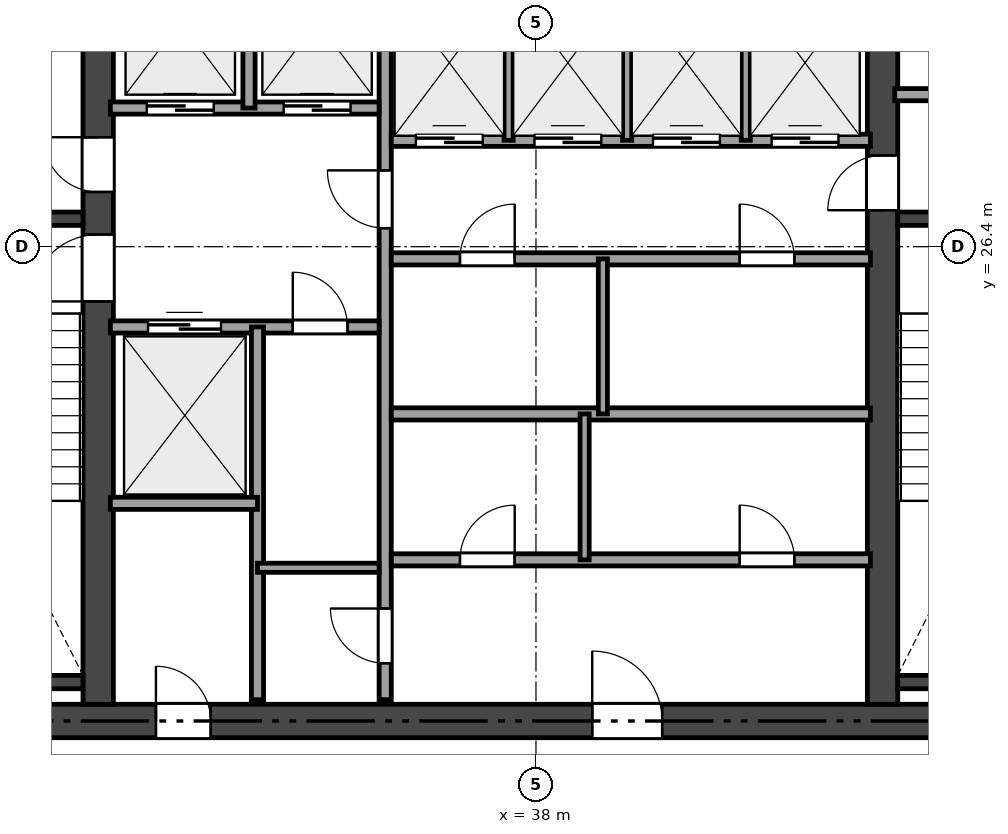
"""IFC4 building model, lengths in metres.
Left out: names, types, materials, properties, quantities, classifications, styles, units other than length and angle.
Written with IfcOpenShell. Run it as: python <this file> out.ifc"""

import sys

from ifc_helpers import new_model, si_unit, direction, frame, frame_2d, origin, place, context, subcontext, project, spatial, rectangle, extrude, element, fill, save


model = new_model("IFC4")
c1 = context("Model", 3, precision=1e-05, world=origin(), true_north=direction((0.0, 1.0)))
c2 = subcontext(c1, "Body", "Model", "MODEL_VIEW")
j1 = project(units=[si_unit("LENGTHUNIT", "METRE"), si_unit("PLANEANGLEUNIT", "RADIAN")], contexts=[c1])
p1 = place(None, origin())
s1 = spatial("IfcSite", under=j1, at=p1, CompositionType="ELEMENT")
p2 = place(p1, origin())
s2 = spatial("IfcBuilding", under=s1, at=p2, CompositionType="ELEMENT")
p3 = place(p2, frame((0.0, 0.0, 275.1)))
s3 = spatial("IfcBuildingStorey", under=s2, at=p3, CompositionType="ELEMENT", Elevation=275.1)
p4 = place(p3, frame((26.525, 18.6, 0.0), z_axis=(0.0, 0.0, 1.0), x_axis=(1.0, 0.0, 0.0)))
e1 = element("IfcWall", 1, at=p4, inside=s3, PredefinedType="SHEAR", context=c2, shape_type="SweptSolid", body=[
    extrude(rectangle(XDim=21.35, YDim=0.55, at=frame_2d((10.675, 0.0))), origin(), (0.0, 0.0, 1.0), 3.92),
])
p5 = place(p4, frame((12.4, 0.0, 0.0)))
e2 = element("IfcOpeningElement", 2, at=p5, cuts=e1, PredefinedType="OPENING", context=c2, shape_type="SweptSolid", body=[
    extrude(rectangle(XDim=1.15, YDim=2.15, at=frame_2d((0.575, 1.075))), frame((0.0, 0.285, 0.0), z_axis=(0.0, -1.0, 0.0), x_axis=(1.0, 0.0, 0.0)), (0.0, 0.0, 1.0), 0.57),
])
p6 = place(p4, frame((5.225, 0.0, 0.0)))
e3 = element("IfcOpeningElement", 3, at=p6, cuts=e1, PredefinedType="OPENING", context=c2, shape_type="SweptSolid", body=[
    extrude(rectangle(XDim=0.9, YDim=2.1, at=frame_2d((0.45, 1.05))), frame((0.0, 0.285, 0.0), z_axis=(0.0, -1.0, 0.0), x_axis=(1.0, 0.0, 0.0)), (0.0, 0.0, 1.0), 0.57),
])
p7 = place(p3, frame((30.8, 18.875, 0.0), z_axis=(0.0, 0.0, 1.0), x_axis=(0.0, 1.0, 0.0)))
e4 = element("IfcWall", 4, at=p7, inside=s3, PredefinedType="SHEAR", context=c2, shape_type="SweptSolid", body=[
    extrude(rectangle(XDim=15.05, YDim=0.5, at=frame_2d((7.525, 0.0))), origin(), (0.0, 0.0, 1.0), 3.92),
])
p8 = place(p7, frame((6.625, 0.0, 0.0)))
e5 = element("IfcOpeningElement", 5, at=p8, cuts=e4, PredefinedType="OPENING", context=c2, shape_type="SweptSolid", body=[
    extrude(rectangle(XDim=1.1, YDim=2.15, at=frame_2d((0.55, 1.075))), frame((0.0, 0.26, 0.0), z_axis=(0.0, -1.0, 0.0), x_axis=(1.0, 0.0, 0.0)), (0.0, 0.0, 1.0), 0.52),
])
p9 = place(p7, frame((8.425, 0.0, 0.0)))
e6 = element("IfcOpeningElement", 6, at=p9, cuts=e4, PredefinedType="OPENING", context=c2, shape_type="SweptSolid", body=[
    extrude(rectangle(XDim=0.9, YDim=2.1, at=frame_2d((0.45, 1.05))), frame((0.0, 0.26, 0.0), z_axis=(0.0, -1.0, 0.0), x_axis=(1.0, 0.0, 0.0)), (0.0, 0.0, 1.0), 0.52),
])
p10 = place(p3, frame((43.7, 18.875, 0.0), z_axis=(0.0, 0.0, 1.0), x_axis=(0.0, 1.0, 0.0)))
e7 = element("IfcWall", 7, at=p10, inside=s3, PredefinedType="SHEAR", context=c2, shape_type="SweptSolid", body=[
    extrude(rectangle(XDim=15.05, YDim=0.5, at=frame_2d((7.525, 0.0))), origin(), (0.0, 0.0, 1.0), 3.92),
])
p11 = place(p10, frame((8.125, 0.0, 0.0)))
e8 = element("IfcOpeningElement", 8, at=p11, cuts=e7, PredefinedType="OPENING", context=c2, shape_type="SweptSolid", body=[
    extrude(rectangle(XDim=0.9, YDim=2.1, at=frame_2d((0.45, 1.05))), frame((0.0, 0.26, 0.0), z_axis=(0.0, -1.0, 0.0), x_axis=(1.0, 0.0, 0.0)), (0.0, 0.0, 1.0), 0.52),
])
for number, where, z_axis, x_axis in (
    (9, (27.075, 26.86, 0.0), (0.0, 0.0, 1.0), (1.0, 0.0, 0.0)),
    (10, (27.075, 19.24, 0.0), (0.0, 0.0, 1.0), (1.0, 0.0, 0.0)),
):
    element("IfcWall", number, at=place(p3, frame(where, z_axis=z_axis, x_axis=x_axis)), inside=s3, PredefinedType="SHEAR", context=c2, shape_type="SweptSolid", body=[
        extrude(rectangle(XDim=3.475, YDim=0.22, at=frame_2d((1.738, 0.0))), origin(), (0.0, 0.0, 1.0), 3.92),
    ])
for number, where, z_axis, x_axis in (
    (11, (43.95, 26.86, 0.0), (0.0, 0.0, 1.0), (1.0, 0.0, 0.0)),
    (12, (43.95, 19.24, 0.0), (0.0, 0.0, 1.0), (1.0, 0.0, 0.0)),
):
    element("IfcWall", number, at=place(p3, frame(where, z_axis=z_axis, x_axis=x_axis)), inside=s3, PredefinedType="SHEAR", context=c2, shape_type="SweptSolid", body=[
        extrude(rectangle(XDim=3.375, YDim=0.22, at=frame_2d((1.688, 0.0))), origin(), (0.0, 0.0, 1.0), 3.92),
    ])
p12 = place(p3, frame((43.9, 28.9, 0.0), z_axis=(0.0, 0.0, 1.0), x_axis=(1.0, 0.0, 0.0)))
e13 = element("IfcWall", 13, at=p12, inside=s3, PredefinedType="SOLIDWALL", context=c2, shape_type="SweptSolid", body=[
    extrude(rectangle(XDim=3.35, YDim=0.2, at=frame_2d((1.675, 0.0))), origin(), (0.0, 0.0, 1.0), 3.92),
])
p13 = place(p12, frame((1.15, 0.0, 0.0)))
e14 = element("IfcOpeningElement", 14, at=p13, cuts=e13, PredefinedType="OPENING", context=c2, shape_type="SweptSolid", body=[
    extrude(rectangle(XDim=0.9, YDim=2.1, at=frame_2d((0.45, 1.05))), frame((0.0, 0.11, 0.0), z_axis=(0.0, -1.0, 0.0), x_axis=(1.0, 0.0, 0.0)), (0.0, 0.0, 1.0), 0.22),
])
p14 = place(p3, frame((35.52, 18.95, 0.0), z_axis=(0.0, 0.0, 1.0), x_axis=(0.0, 1.0, 0.0)))
e15 = element("IfcWall", 15, at=p14, inside=s3, PredefinedType="SOLIDWALL", context=c2, shape_type="SweptSolid", body=[
    extrude(rectangle(XDim=14.9, YDim=0.2, at=frame_2d((7.45, 0.0))), origin(), (0.0, 0.0, 1.0), 3.441),
])
p15 = place(p14, frame((7.755, 0.0, 0.0)))
e16 = element("IfcOpeningElement", 16, at=p15, cuts=e15, PredefinedType="OPENING", context=c2, shape_type="SweptSolid", body=[
    extrude(rectangle(XDim=0.95, YDim=2.15, at=frame_2d((0.475, 1.075))), frame((0.0, 0.11, 0.0), z_axis=(0.0, -1.0, 0.0), x_axis=(1.0, 0.0, 0.0)), (0.0, 0.0, 1.0), 0.22),
])
p16 = place(p14, frame((0.6, 0.0, 0.0)))
e17 = element("IfcOpeningElement", 17, at=p16, cuts=e15, PredefinedType="OPENING", context=c2, shape_type="SweptSolid", body=[
    extrude(rectangle(XDim=0.9, YDim=2.1, at=frame_2d((0.45, 1.05))), frame((0.0, 0.11, 0.0), z_axis=(0.0, -1.0, 0.0), x_axis=(1.0, 0.0, 0.0)), (0.0, 0.0, 1.0), 0.22),
])
p17 = place(p3, frame((31.0, 28.68, 0.0), z_axis=(0.0, 0.0, 1.0), x_axis=(1.0, 0.0, 0.0)))
e18 = element("IfcWall", 18, at=p17, inside=s3, PredefinedType="SOLIDWALL", context=c2, shape_type="SweptSolid", body=[
    extrude(rectangle(XDim=4.42, YDim=0.2, at=frame_2d((2.21, 0.0))), origin(), (0.0, 0.0, 1.0), 3.92),
])
p18 = place(p17, frame((0.6, 0.0, 0.0)))
e19 = element("IfcOpeningElement", 19, at=p18, cuts=e18, PredefinedType="OPENING", context=c2, shape_type="SweptSolid", body=[
    extrude(rectangle(XDim=1.1, YDim=2.15, at=frame_2d((0.55, 1.075))), frame((0.0, 0.11, 0.0), z_axis=(0.0, -1.0, 0.0), x_axis=(1.0, 0.0, 0.0)), (0.0, 0.0, 1.0), 0.22),
])
p19 = place(p17, frame((2.85, 0.0, 0.0)))
e20 = element("IfcOpeningElement", 20, at=p19, cuts=e18, PredefinedType="OPENING", context=c2, shape_type="SweptSolid", body=[
    extrude(rectangle(XDim=1.1, YDim=2.15, at=frame_2d((0.55, 1.075))), frame((0.0, 0.11, 0.0), z_axis=(0.0, -1.0, 0.0), x_axis=(1.0, 0.0, 0.0)), (0.0, 0.0, 1.0), 0.22),
])
p20 = place(p3, frame((33.28, 28.68, 0.0), z_axis=(0.0, 0.0, 1.0), x_axis=(0.0, 1.0, 0.0)))
e21 = element("IfcWall", 21, at=p20, inside=s3, PredefinedType="SOLIDWALL", context=c2, shape_type="SweptSolid", body=[
    extrude(rectangle(XDim=2.82, YDim=0.2, at=frame_2d((1.41, 0.0))), origin(), (0.0, 0.0, 1.0), 3.92),
])
p21 = place(p3, frame((31.0, 25.08, 0.0), z_axis=(0.0, 0.0, 1.0), x_axis=(1.0, 0.0, 0.0)))
e22 = element("IfcWall", 22, at=p21, inside=s3, PredefinedType="SOLIDWALL", context=c2, shape_type="SweptSolid", body=[
    extrude(rectangle(XDim=4.42, YDim=0.2, at=frame_2d((2.21, 0.0))), origin(), (0.0, 0.0, 1.0), 3.92),
])
p22 = place(p21, frame((3.0, 0.0, 0.0)))
e23 = element("IfcOpeningElement", 23, at=p22, cuts=e22, PredefinedType="OPENING", context=c2, shape_type="SweptSolid", body=[
    extrude(rectangle(XDim=0.9, YDim=2.1, at=frame_2d((0.45, 1.05))), frame((0.0, 0.11, 0.0), z_axis=(0.0, -1.0, 0.0), x_axis=(1.0, 0.0, 0.0)), (0.0, 0.0, 1.0), 0.22),
])
p23 = place(p21, frame((0.62, 0.0, 0.0)))
e24 = element("IfcOpeningElement", 24, at=p23, cuts=e22, PredefinedType="OPENING", context=c2, shape_type="SweptSolid", body=[
    extrude(rectangle(XDim=1.2, YDim=2.15, at=frame_2d((0.6, 1.075))), frame((0.0, 0.11, 0.0), z_axis=(0.0, -1.0, 0.0), x_axis=(1.0, 0.0, 0.0)), (0.0, 0.0, 1.0), 0.22),
])
p24 = place(p3, frame((33.42, 18.95, 0.0), z_axis=(0.0, 0.0, 1.0), x_axis=(0.0, 1.0, 0.0)))
e25 = element("IfcWall", 25, at=p24, inside=s3, PredefinedType="SOLIDWALL", context=c2, shape_type="SweptSolid", body=[
    extrude(rectangle(XDim=6.13, YDim=0.2, at=frame_2d((3.065, 0.0))), origin(), (0.0, 0.0, 1.0), 3.441),
])
p25 = place(p3, frame((31.0, 22.18, 0.0), z_axis=(0.0, 0.0, 1.0), x_axis=(1.0, 0.0, 0.0)))
e26 = element("IfcWall", 26, at=p25, inside=s3, PredefinedType="SOLIDWALL", context=c2, shape_type="SweptSolid", body=[
    extrude(rectangle(XDim=2.42, YDim=0.2, at=frame_2d((1.21, 0.0))), origin(), (0.0, 0.0, 1.0), 3.92),
])
p26 = place(p3, frame((33.42, 21.12, 0.0), z_axis=(0.0, 0.0, 1.0), x_axis=(1.0, 0.0, 0.0)))
e27 = element("IfcWall", 27, at=p26, inside=s3, PredefinedType="PARTITIONING", context=c2, shape_type="SweptSolid", body=[
    extrude(rectangle(XDim=2.0, YDim=0.15, at=frame_2d((1.0, 0.0))), origin(), (0.0, 0.0, 1.0), 3.92),
])
p27 = place(p3, frame((35.62, 28.15, 0.0), z_axis=(0.0, 0.0, 1.0), x_axis=(1.0, 0.0, 0.0)))
e28 = element("IfcWall", 28, at=p27, inside=s3, PredefinedType="SOLIDWALL", context=c2, shape_type="SweptSolid", body=[
    extrude(rectangle(XDim=7.88, YDim=0.2, at=frame_2d((3.94, 0.0))), origin(), (0.0, 0.0, 1.0), 3.92),
])
p28 = place(p27, frame((0.405, 0.0, 0.0)))
e29 = element("IfcOpeningElement", 29, at=p28, cuts=e28, PredefinedType="OPENING", context=c2, shape_type="SweptSolid", body=[
    extrude(rectangle(XDim=1.1, YDim=2.15, at=frame_2d((0.55, 1.075))), frame((0.0, 0.11, 0.0), z_axis=(0.0, -1.0, 0.0), x_axis=(1.0, 0.0, 0.0)), (0.0, 0.0, 1.0), 0.22),
])
p29 = place(p27, frame((2.355, 0.0, 0.0)))
e30 = element("IfcOpeningElement", 30, at=p29, cuts=e28, PredefinedType="OPENING", context=c2, shape_type="SweptSolid", body=[
    extrude(rectangle(XDim=1.1, YDim=2.15, at=frame_2d((0.55, 1.075))), frame((0.0, 0.11, 0.0), z_axis=(0.0, -1.0, 0.0), x_axis=(1.0, 0.0, 0.0)), (0.0, 0.0, 1.0), 0.22),
])
p30 = place(p27, frame((4.305, 0.0, 0.0)))
e31 = element("IfcOpeningElement", 31, at=p30, cuts=e28, PredefinedType="OPENING", context=c2, shape_type="SweptSolid", body=[
    extrude(rectangle(XDim=1.1, YDim=2.15, at=frame_2d((0.55, 1.075))), frame((0.0, 0.11, 0.0), z_axis=(0.0, -1.0, 0.0), x_axis=(1.0, 0.0, 0.0)), (0.0, 0.0, 1.0), 0.22),
])
p31 = place(p27, frame((6.255, 0.0, 0.0)))
e32 = element("IfcOpeningElement", 32, at=p31, cuts=e28, PredefinedType="OPENING", context=c2, shape_type="SweptSolid", body=[
    extrude(rectangle(XDim=1.1, YDim=2.15, at=frame_2d((0.55, 1.075))), frame((0.0, 0.11, 0.0), z_axis=(0.0, -1.0, 0.0), x_axis=(1.0, 0.0, 0.0)), (0.0, 0.0, 1.0), 0.22),
])
p32 = place(p3, frame((35.62, 26.2, 0.0), z_axis=(0.0, 0.0, 1.0), x_axis=(1.0, 0.0, 0.0)))
e33 = element("IfcWall", 33, at=p32, inside=s3, PredefinedType="SOLIDWALL", context=c2, shape_type="SweptSolid", body=[
    extrude(rectangle(XDim=7.88, YDim=0.2, at=frame_2d((3.94, 0.0))), origin(), (0.0, 0.0, 1.0), 3.92),
])
p33 = place(p32, frame((1.13, 0.0, 0.0)))
e34 = element("IfcOpeningElement", 34, at=p33, cuts=e33, PredefinedType="OPENING", context=c2, shape_type="SweptSolid", body=[
    extrude(rectangle(XDim=0.9, YDim=2.1, at=frame_2d((0.45, 1.05))), frame((0.0, 0.11, 0.0), z_axis=(0.0, -1.0, 0.0), x_axis=(1.0, 0.0, 0.0)), (0.0, 0.0, 1.0), 0.22),
])
p34 = place(p32, frame((5.73, 0.0, 0.0)))
e35 = element("IfcOpeningElement", 35, at=p34, cuts=e33, PredefinedType="OPENING", context=c2, shape_type="SweptSolid", body=[
    extrude(rectangle(XDim=0.9, YDim=2.1, at=frame_2d((0.45, 1.05))), frame((0.0, 0.11, 0.0), z_axis=(0.0, -1.0, 0.0), x_axis=(1.0, 0.0, 0.0)), (0.0, 0.0, 1.0), 0.22),
])
p35 = place(p3, frame((35.62, 23.65, 0.0), z_axis=(0.0, 0.0, 1.0), x_axis=(1.0, 0.0, 0.0)))
e36 = element("IfcWall", 36, at=p35, inside=s3, PredefinedType="SOLIDWALL", context=c2, shape_type="SweptSolid", body=[
    extrude(rectangle(XDim=7.88, YDim=0.2, at=frame_2d((3.94, 0.0))), origin(), (0.0, 0.0, 1.0), 3.441),
])
p36 = place(p3, frame((35.62, 21.25, 0.0), z_axis=(0.0, 0.0, 1.0), x_axis=(1.0, 0.0, 0.0)))
e37 = element("IfcWall", 37, at=p36, inside=s3, PredefinedType="SOLIDWALL", context=c2, shape_type="SweptSolid", body=[
    extrude(rectangle(XDim=7.88, YDim=0.2, at=frame_2d((3.94, 0.0))), origin(), (0.0, 0.0, 1.0), 3.92),
])
p37 = place(p36, frame((1.13, 0.0, 0.0)))
e38 = element("IfcOpeningElement", 38, at=p37, cuts=e37, PredefinedType="OPENING", context=c2, shape_type="SweptSolid", body=[
    extrude(rectangle(XDim=0.9, YDim=2.1, at=frame_2d((0.45, 1.05))), frame((0.0, 0.11, 0.0), z_axis=(0.0, -1.0, 0.0), x_axis=(1.0, 0.0, 0.0)), (0.0, 0.0, 1.0), 0.22),
])
p38 = place(p36, frame((5.73, 0.0, 0.0)))
e39 = element("IfcOpeningElement", 39, at=p38, cuts=e37, PredefinedType="OPENING", context=c2, shape_type="SweptSolid", body=[
    extrude(rectangle(XDim=0.9, YDim=2.1, at=frame_2d((0.45, 1.05))), frame((0.0, 0.11, 0.0), z_axis=(0.0, -1.0, 0.0), x_axis=(1.0, 0.0, 0.0)), (0.0, 0.0, 1.0), 0.22),
])
for number, where, z_axis, x_axis in (
    (40, (37.55, 28.15, 0.0), (0.0, 0.0, 1.0), (0.0, 1.0, 0.0)),
    (41, (39.5, 28.15, 0.0), (0.0, 0.0, 1.0), (0.0, 1.0, 0.0)),
    (42, (41.45, 28.15, 0.0), (0.0, 0.0, 1.0), (0.0, 1.0, 0.0)),
):
    element("IfcWall", number, at=place(p3, frame(where, z_axis=z_axis, x_axis=x_axis)), inside=s3, PredefinedType="PARTITIONING", context=c2, shape_type="SweptSolid", body=[
        extrude(rectangle(XDim=2.43, YDim=0.15, at=frame_2d((1.215, 0.0))), origin(), (0.0, 0.0, 1.0), 3.92),
    ])
p39 = place(p3, frame((39.1, 23.65, 0.0), z_axis=(0.0, 0.0, 1.0), x_axis=(0.0, 1.0, 0.0)))
e43 = element("IfcWall", 43, at=p39, inside=s3, PredefinedType="PARTITIONING", context=c2, shape_type="SweptSolid", body=[
    extrude(rectangle(XDim=2.55, YDim=0.15, at=frame_2d((1.275, 0.0))), origin(), (0.0, 0.0, 1.0), 3.441),
])
p40 = place(p3, frame((38.8, 21.25, 0.0), z_axis=(0.0, 0.0, 1.0), x_axis=(0.0, 1.0, 0.0)))
e44 = element("IfcWall", 44, at=p40, inside=s3, PredefinedType="PARTITIONING", context=c2, shape_type="SweptSolid", body=[
    extrude(rectangle(XDim=2.4, YDim=0.15, at=frame_2d((1.2, 0.0))), origin(), (0.0, 0.0, 1.0), 3.441),
])
p41 = place(p8, origin())
e45 = element("IfcDoor", 45, at=p41, inside=s3, OperationType="SINGLE_SWING_LEFT", PredefinedType="DOOR", context=c2, shape_type="SweptSolid", body=[
    extrude(rectangle(XDim=1.1, YDim=2.15, at=frame_2d((0.55, 1.075))), frame((0.0, 0.025, 0.0), z_axis=(0.0, -1.0, 0.0), x_axis=(1.0, 0.0, 0.0)), (0.0, 0.0, 1.0), 0.05),
])
fill(e5, e45)
p42 = place(p15, origin())
e46 = element("IfcDoor", 46, at=p42, inside=s3, OperationType="SINGLE_SWING_RIGHT", PredefinedType="DOOR", context=c2, shape_type="SweptSolid", body=[
    extrude(rectangle(XDim=0.95, YDim=2.15, at=frame_2d((0.475, 1.075))), frame((0.0, 0.025, 0.0), z_axis=(0.0, -1.0, 0.0), x_axis=(1.0, 0.0, 0.0)), (0.0, 0.0, 1.0), 0.05),
])
fill(e16, e46)
p43 = place(p11, origin())
e47 = element("IfcDoor", 47, at=p43, inside=s3, OperationType="SINGLE_SWING_LEFT", PredefinedType="DOOR", context=c2, shape_type="SweptSolid", body=[
    extrude(rectangle(XDim=0.9, YDim=2.1, at=frame_2d((0.45, 1.05))), frame((0.0, 0.025, 0.0), z_axis=(0.0, -1.0, 0.0), x_axis=(1.0, 0.0, 0.0)), (0.0, 0.0, 1.0), 0.05),
])
fill(e8, e47)
p44 = place(p5, origin())
e48 = element("IfcDoor", 48, at=p44, inside=s3, OperationType="SINGLE_SWING_LEFT", PredefinedType="DOOR", context=c2, shape_type="SweptSolid", body=[
    extrude(rectangle(XDim=1.15, YDim=2.15, at=frame_2d((0.575, 1.075))), frame((0.0, 0.025, 0.0), z_axis=(0.0, -1.0, 0.0), x_axis=(1.0, 0.0, 0.0)), (0.0, 0.0, 1.0), 0.05),
])
fill(e2, e48)
p45 = place(p9, origin())
e49 = element("IfcDoor", 49, at=p45, inside=s3, OperationType="SINGLE_SWING_RIGHT", PredefinedType="DOOR", context=c2, shape_type="SweptSolid", body=[
    extrude(rectangle(XDim=0.9, YDim=2.1, at=frame_2d((0.45, 1.05))), frame((0.0, 0.025, 0.0), z_axis=(0.0, -1.0, 0.0), x_axis=(1.0, 0.0, 0.0)), (0.0, 0.0, 1.0), 0.05),
])
fill(e6, e49)
p46 = place(p6, origin())
e50 = element("IfcDoor", 50, at=p46, inside=s3, OperationType="SINGLE_SWING_LEFT", PredefinedType="DOOR", context=c2, shape_type="SweptSolid", body=[
    extrude(rectangle(XDim=0.9, YDim=2.1, at=frame_2d((0.45, 1.05))), frame((0.0, 0.025, 0.0), z_axis=(0.0, -1.0, 0.0), x_axis=(1.0, 0.0, 0.0)), (0.0, 0.0, 1.0), 0.05),
])
fill(e3, e50)
p47 = place(p16, origin())
e51 = element("IfcDoor", 51, at=p47, inside=s3, OperationType="SINGLE_SWING_RIGHT", PredefinedType="DOOR", context=c2, shape_type="SweptSolid", body=[
    extrude(rectangle(XDim=0.9, YDim=2.1, at=frame_2d((0.45, 1.05))), frame((0.0, 0.025, 0.0), z_axis=(0.0, -1.0, 0.0), x_axis=(1.0, 0.0, 0.0)), (0.0, 0.0, 1.0), 0.05),
])
fill(e17, e51)
p48 = place(p22, origin())
e52 = element("IfcDoor", 52, at=p48, inside=s3, OperationType="SINGLE_SWING_LEFT", PredefinedType="DOOR", context=c2, shape_type="SweptSolid", body=[
    extrude(rectangle(XDim=0.9, YDim=2.1, at=frame_2d((0.45, 1.05))), frame((0.0, 0.025, 0.0), z_axis=(0.0, -1.0, 0.0), x_axis=(1.0, 0.0, 0.0)), (0.0, 0.0, 1.0), 0.05),
])
fill(e23, e52)
p49 = place(p37, origin())
e53 = element("IfcDoor", 53, at=p49, inside=s3, OperationType="SINGLE_SWING_RIGHT", PredefinedType="DOOR", context=c2, shape_type="SweptSolid", body=[
    extrude(rectangle(XDim=0.9, YDim=2.1, at=frame_2d((0.45, 1.05))), frame((0.0, 0.025, 0.0), z_axis=(0.0, -1.0, 0.0), x_axis=(1.0, 0.0, 0.0)), (0.0, 0.0, 1.0), 0.05),
])
fill(e38, e53)
p50 = place(p38, origin())
e54 = element("IfcDoor", 54, at=p50, inside=s3, OperationType="SINGLE_SWING_LEFT", PredefinedType="DOOR", context=c2, shape_type="SweptSolid", body=[
    extrude(rectangle(XDim=0.9, YDim=2.1, at=frame_2d((0.45, 1.05))), frame((0.0, 0.025, 0.0), z_axis=(0.0, -1.0, 0.0), x_axis=(1.0, 0.0, 0.0)), (0.0, 0.0, 1.0), 0.05),
])
fill(e39, e54)
p51 = place(p33, origin())
e55 = element("IfcDoor", 55, at=p51, inside=s3, OperationType="SINGLE_SWING_RIGHT", PredefinedType="DOOR", context=c2, shape_type="SweptSolid", body=[
    extrude(rectangle(XDim=0.9, YDim=2.1, at=frame_2d((0.45, 1.05))), frame((0.0, 0.025, 0.0), z_axis=(0.0, -1.0, 0.0), x_axis=(1.0, 0.0, 0.0)), (0.0, 0.0, 1.0), 0.05),
])
fill(e34, e55)
p52 = place(p34, origin())
e56 = element("IfcDoor", 56, at=p52, inside=s3, OperationType="SINGLE_SWING_LEFT", PredefinedType="DOOR", context=c2, shape_type="SweptSolid", body=[
    extrude(rectangle(XDim=0.9, YDim=2.1, at=frame_2d((0.45, 1.05))), frame((0.0, 0.025, 0.0), z_axis=(0.0, -1.0, 0.0), x_axis=(1.0, 0.0, 0.0)), (0.0, 0.0, 1.0), 0.05),
])
fill(e35, e56)
p53 = place(p18, origin())
e57 = element("IfcDoor", 57, at=p53, inside=s3, OperationType="SLIDING_TO_LEFT", PredefinedType="DOOR", context=c2, shape_type="SweptSolid", body=[
    extrude(rectangle(XDim=1.1, YDim=2.15, at=frame_2d((0.55, 1.075))), frame((0.0, 0.025, 0.0), z_axis=(0.0, -1.0, 0.0), x_axis=(1.0, 0.0, 0.0)), (0.0, 0.0, 1.0), 0.05),
])
fill(e19, e57)
p54 = place(p19, origin())
e58 = element("IfcDoor", 58, at=p54, inside=s3, OperationType="SLIDING_TO_LEFT", PredefinedType="DOOR", context=c2, shape_type="SweptSolid", body=[
    extrude(rectangle(XDim=1.1, YDim=2.15, at=frame_2d((0.55, 1.075))), frame((0.0, 0.025, 0.0), z_axis=(0.0, -1.0, 0.0), x_axis=(1.0, 0.0, 0.0)), (0.0, 0.0, 1.0), 0.05),
])
fill(e20, e58)
p55 = place(p23, origin())
e59 = element("IfcDoor", 59, at=p55, inside=s3, OperationType="SLIDING_TO_LEFT", PredefinedType="DOOR", context=c2, shape_type="SweptSolid", body=[
    extrude(rectangle(XDim=1.2, YDim=2.15, at=frame_2d((0.6, 1.075))), frame((0.0, 0.025, 0.0), z_axis=(0.0, -1.0, 0.0), x_axis=(1.0, 0.0, 0.0)), (0.0, 0.0, 1.0), 0.05),
])
fill(e24, e59)
p56 = place(p28, origin())
e60 = element("IfcDoor", 60, at=p56, inside=s3, OperationType="SLIDING_TO_LEFT", PredefinedType="DOOR", context=c2, shape_type="SweptSolid", body=[
    extrude(rectangle(XDim=1.1, YDim=2.15, at=frame_2d((0.55, 1.075))), frame((0.0, 0.025, 0.0), z_axis=(0.0, -1.0, 0.0), x_axis=(1.0, 0.0, 0.0)), (0.0, 0.0, 1.0), 0.05),
])
fill(e29, e60)
p57 = place(p29, origin())
e61 = element("IfcDoor", 61, at=p57, inside=s3, OperationType="SLIDING_TO_LEFT", PredefinedType="DOOR", context=c2, shape_type="SweptSolid", body=[
    extrude(rectangle(XDim=1.1, YDim=2.15, at=frame_2d((0.55, 1.075))), frame((0.0, 0.025, 0.0), z_axis=(0.0, -1.0, 0.0), x_axis=(1.0, 0.0, 0.0)), (0.0, 0.0, 1.0), 0.05),
])
fill(e30, e61)
p58 = place(p30, origin())
e62 = element("IfcDoor", 62, at=p58, inside=s3, OperationType="SLIDING_TO_LEFT", PredefinedType="DOOR", context=c2, shape_type="SweptSolid", body=[
    extrude(rectangle(XDim=1.1, YDim=2.15, at=frame_2d((0.55, 1.075))), frame((0.0, 0.025, 0.0), z_axis=(0.0, -1.0, 0.0), x_axis=(1.0, 0.0, 0.0)), (0.0, 0.0, 1.0), 0.05),
])
fill(e31, e62)
p59 = place(p31, origin())
e63 = element("IfcDoor", 63, at=p59, inside=s3, OperationType="SLIDING_TO_LEFT", PredefinedType="DOOR", context=c2, shape_type="SweptSolid", body=[
    extrude(rectangle(XDim=1.1, YDim=2.15, at=frame_2d((0.55, 1.075))), frame((0.0, 0.025, 0.0), z_axis=(0.0, -1.0, 0.0), x_axis=(1.0, 0.0, 0.0)), (0.0, 0.0, 1.0), 0.05),
])
fill(e32, e63)
save(model, sys.argv[1])
